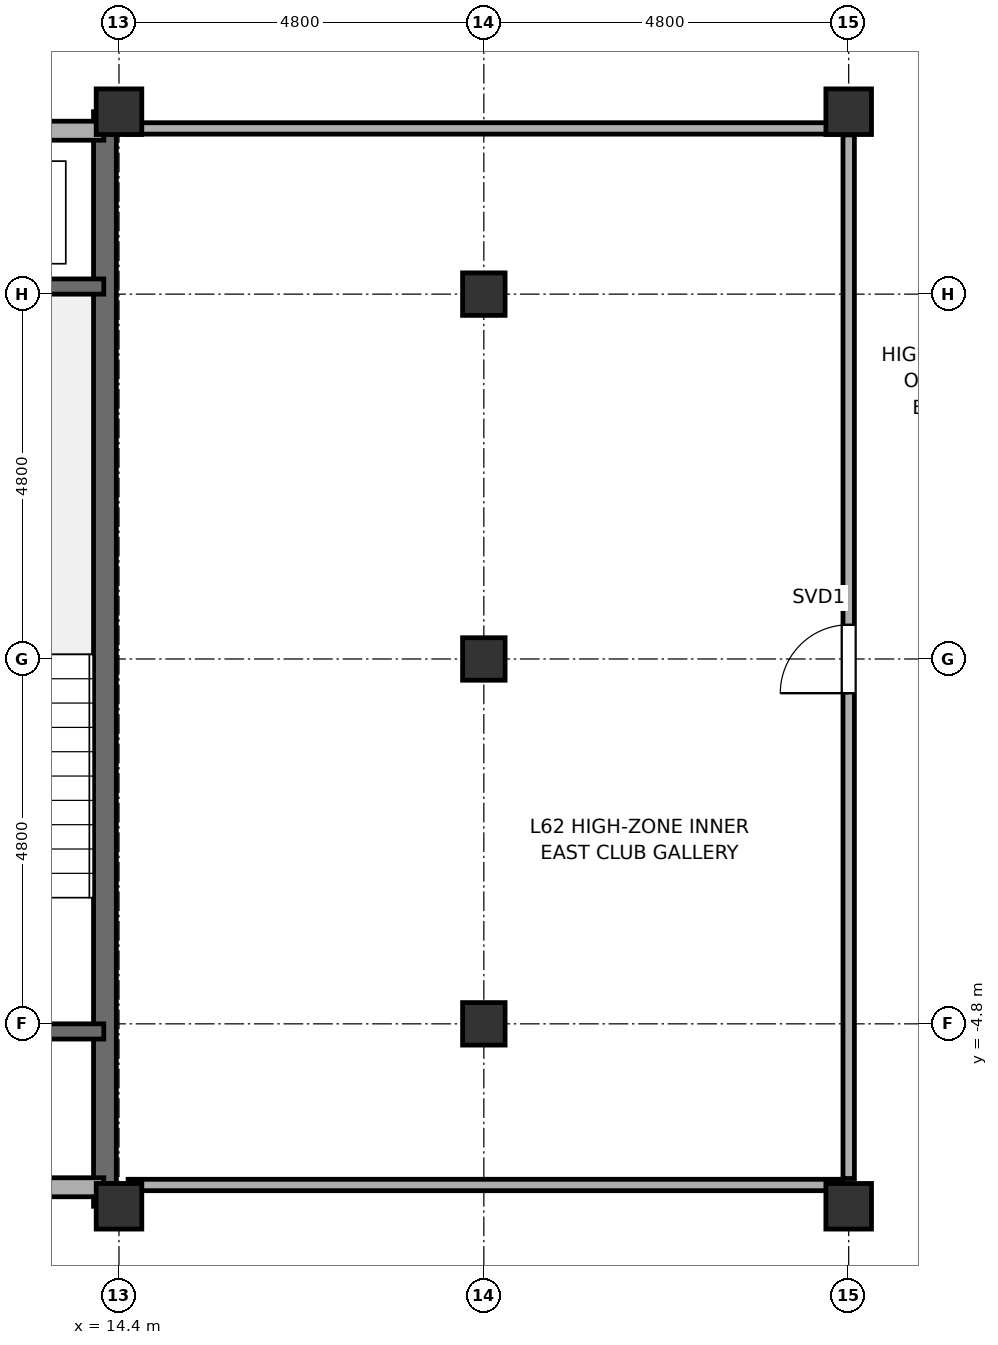
"""IFC4 building model, lengths in metres.
Left out: names, types, materials, properties, quantities, classifications, styles, units other than length and angle.
Written with IfcOpenShell. Run it as: python <this file> out.ifc"""

import sys

from ifc_helpers import new_model, si_unit, direction, frame, frame_2d, origin, origin_2d, place, context, subcontext, project, spatial, rectangle, hollow_rectangle, hollow_circle, extrude, element, fill, save


model = new_model("IFC4")
c1 = context("Model", 3, precision=1e-05, world=origin(), true_north=direction((0.0, 1.0)))
c2 = subcontext(c1, "Body", "Model", "MODEL_VIEW")
j1 = project(units=[si_unit("LENGTHUNIT", "METRE"), si_unit("PLANEANGLEUNIT", "RADIAN")], contexts=[c1])
p1 = place(None, origin())
s1 = spatial("IfcSite", under=j1, at=p1, CompositionType="ELEMENT")
p2 = place(p1, origin())
s2 = spatial("IfcBuilding", under=s1, at=p2, CompositionType="ELEMENT")
p3 = place(p2, frame((0.0, 0.0, 249.25)))
s3 = spatial("IfcBuildingStorey", under=s2, at=p3, CompositionType="ELEMENT", Elevation=249.25)
for number, where, z_axis, x_axis in (
    (1, (14.4, -7.2, 0.0), (0.0, 0.0, 1.0), (1.0, 0.0, 0.0)),
    (2, (14.4, 7.2, 0.0), (0.0, 0.0, 1.0), (1.0, 0.0, 0.0)),
):
    element("IfcColumn", number, at=place(p3, frame(where, z_axis=z_axis, x_axis=x_axis)), inside=s3, PredefinedType="COLUMN", context=c2, shape_type="SweptSolid", body=[
        extrude(hollow_rectangle(XDim=0.6, YDim=0.6, WallThickness=0.028, at=origin_2d()), origin(), (0.0, 0.0, 1.0), 3.85),
    ])
for number, where, z_axis, x_axis in (
    (3, (19.2, -4.8, 0.0), (0.0, 0.0, 1.0), (1.0, 0.0, 0.0)),
    (4, (19.2, 0.0, 0.0), (0.0, 0.0, 1.0), (1.0, 0.0, 0.0)),
    (5, (19.2, 4.8, 0.0), (0.0, 0.0, 1.0), (1.0, 0.0, 0.0)),
):
    element("IfcColumn", number, at=place(p3, frame(where, z_axis=z_axis, x_axis=x_axis)), inside=s3, PredefinedType="COLUMN", context=c2, shape_type="SweptSolid", body=[
        extrude(hollow_circle(Radius=0.28, WallThickness=0.025, at=origin_2d()), origin(), (0.0, 0.0, 1.0), 3.85),
    ])
for number, where, z_axis, x_axis in (
    (6, (24.0, -7.2, 0.0), (0.0, 0.0, 1.0), (1.0, 0.0, 0.0)),
    (7, (24.0, 7.2, 0.0), (0.0, 0.0, 1.0), (1.0, 0.0, 0.0)),
):
    element("IfcColumn", number, at=place(p3, frame(where, z_axis=z_axis, x_axis=x_axis)), inside=s3, PredefinedType="COLUMN", context=c2, shape_type="SweptSolid", body=[
        extrude(hollow_rectangle(XDim=0.6, YDim=0.6, WallThickness=0.028, at=origin_2d()), origin(), (0.0, 0.0, 1.0), 3.85),
    ])
p4 = place(p3, frame((14.215, -7.2, -0.18), z_axis=(0.0, 0.0, 1.0), x_axis=(0.0, 1.0, 0.0)))
e8 = element("IfcWall", 8, at=p4, inside=s3, PredefinedType="SHEAR", context=c2, shape_type="SweptSolid", body=[
    extrude(rectangle(XDim=14.4, YDim=0.3, at=frame_2d((7.2, 0.0))), origin(), (0.0, 0.0, 1.0), 3.85),
])
p5 = place(p3, frame((4.8, -6.95, 0.0), z_axis=(0.0, 0.0, 1.0), x_axis=(1.0, 0.0, 0.0)))
e9 = element("IfcWall", 9, at=p5, inside=s3, PredefinedType="SOLIDWALL", context=c2, shape_type="SweptSolid", body=[
    extrude(rectangle(XDim=9.4, YDim=0.25, at=frame_2d((4.7, 0.0))), origin(), (0.0, 0.0, 1.0), 2.27),
])
p6 = place(p5, frame((3.5, 0.0, 0.0)))
e10 = element("IfcOpeningElement", 10, at=p6, cuts=e9, PredefinedType="OPENING", context=c2, shape_type="SweptSolid", body=[
    extrude(rectangle(XDim=1.0, YDim=2.15, at=frame_2d((0.5, 1.075))), frame((0.0, 0.14, 0.0), z_axis=(0.0, -1.0, 0.0), x_axis=(1.0, 0.0, 0.0)), (0.0, 0.0, 1.0), 0.28),
])
p7 = place(p5, frame((0.95, 0.0, 0.0)))
e11 = element("IfcOpeningElement", 11, at=p7, cuts=e9, PredefinedType="OPENING", context=c2, shape_type="SweptSolid", body=[
    extrude(rectangle(XDim=0.9, YDim=2.1, at=frame_2d((0.45, 1.05))), frame((0.0, 0.14, 0.0), z_axis=(0.0, -1.0, 0.0), x_axis=(1.0, 0.0, 0.0)), (0.0, 0.0, 1.0), 0.28),
])
p8 = place(p3, frame((4.8, 6.95, 0.0), z_axis=(0.0, 0.0, 1.0), x_axis=(1.0, 0.0, 0.0)))
e12 = element("IfcWall", 12, at=p8, inside=s3, PredefinedType="SOLIDWALL", context=c2, shape_type="SweptSolid", body=[
    extrude(rectangle(XDim=9.4, YDim=0.25, at=frame_2d((4.7, 0.0))), origin(), (0.0, 0.0, 1.0), 2.27),
])
p9 = place(p8, frame((3.5, 0.0, 0.0)))
e13 = element("IfcOpeningElement", 13, at=p9, cuts=e12, PredefinedType="OPENING", context=c2, shape_type="SweptSolid", body=[
    extrude(rectangle(XDim=1.2, YDim=2.2, at=frame_2d((0.6, 1.1))), frame((0.0, 0.14, 0.0), z_axis=(0.0, -1.0, 0.0), x_axis=(1.0, 0.0, 0.0)), (0.0, 0.0, 1.0), 0.28),
])
for number, where, z_axis, x_axis in (
    (14, (10.55, -4.9, -0.18), (0.0, 0.0, 1.0), (1.0, 0.0, 0.0)),
    (15, (10.55, 4.9, -0.18), (0.0, 0.0, 1.0), (1.0, 0.0, 0.0)),
):
    element("IfcWall", number, at=place(p3, frame(where, z_axis=z_axis, x_axis=x_axis)), inside=s3, PredefinedType="SOLIDWALL", context=c2, shape_type="SweptSolid", body=[
        extrude(rectangle(XDim=3.65, YDim=0.2, at=frame_2d((1.825, 0.0))), origin(), (0.0, 0.0, 1.0), 3.85),
    ])
for number, where, z_axis, x_axis in (
    (16, (14.52, -6.92, 0.0), (0.0, 0.0, 1.0), (1.0, 0.0, 0.0)),
    (17, (14.52, 6.98, 0.0), (0.0, 0.0, 1.0), (1.0, 0.0, 0.0)),
):
    element("IfcWall", number, at=place(p3, frame(where, z_axis=z_axis, x_axis=x_axis)), inside=s3, PredefinedType="PARTITIONING", context=c2, shape_type="SweptSolid", body=[
        extrude(rectangle(XDim=9.4, YDim=0.15, at=frame_2d((4.7, 0.0))), origin(), (0.0, 0.0, 1.0), 2.27),
    ])
p10 = place(p3, frame((24.0, -6.835, 0.0), z_axis=(0.0, 0.0, 1.0), x_axis=(0.0, 1.0, 0.0)))
e18 = element("IfcWall", 18, at=p10, inside=s3, PredefinedType="PARTITIONING", context=c2, shape_type="SweptSolid", body=[
    extrude(rectangle(XDim=13.73, YDim=0.15, at=frame_2d((6.865, 0.0))), origin(), (0.0, 0.0, 1.0), 2.27),
])
p11 = place(p10, frame((6.385, 0.0, 0.0)))
e19 = element("IfcOpeningElement", 19, at=p11, cuts=e18, PredefinedType="OPENING", context=c2, shape_type="SweptSolid", body=[
    extrude(rectangle(XDim=0.9, YDim=2.1, at=frame_2d((0.45, 1.05))), frame((0.0, 0.09, 0.0), z_axis=(0.0, -1.0, 0.0), x_axis=(1.0, 0.0, 0.0)), (0.0, 0.0, 1.0), 0.18),
])
p12 = place(p11, origin())
e20 = element("IfcDoor", 20, at=p12, inside=s3, OperationType="SINGLE_SWING_RIGHT", PredefinedType="DOOR", context=c2, shape_type="SweptSolid", body=[
    extrude(rectangle(XDim=0.9, YDim=2.1, at=frame_2d((0.45, 1.05))), frame((0.0, 0.025, 0.0), z_axis=(0.0, -1.0, 0.0), x_axis=(1.0, 0.0, 0.0)), (0.0, 0.0, 1.0), 0.05),
])
fill(e19, e20)
save(model, sys.argv[1])
